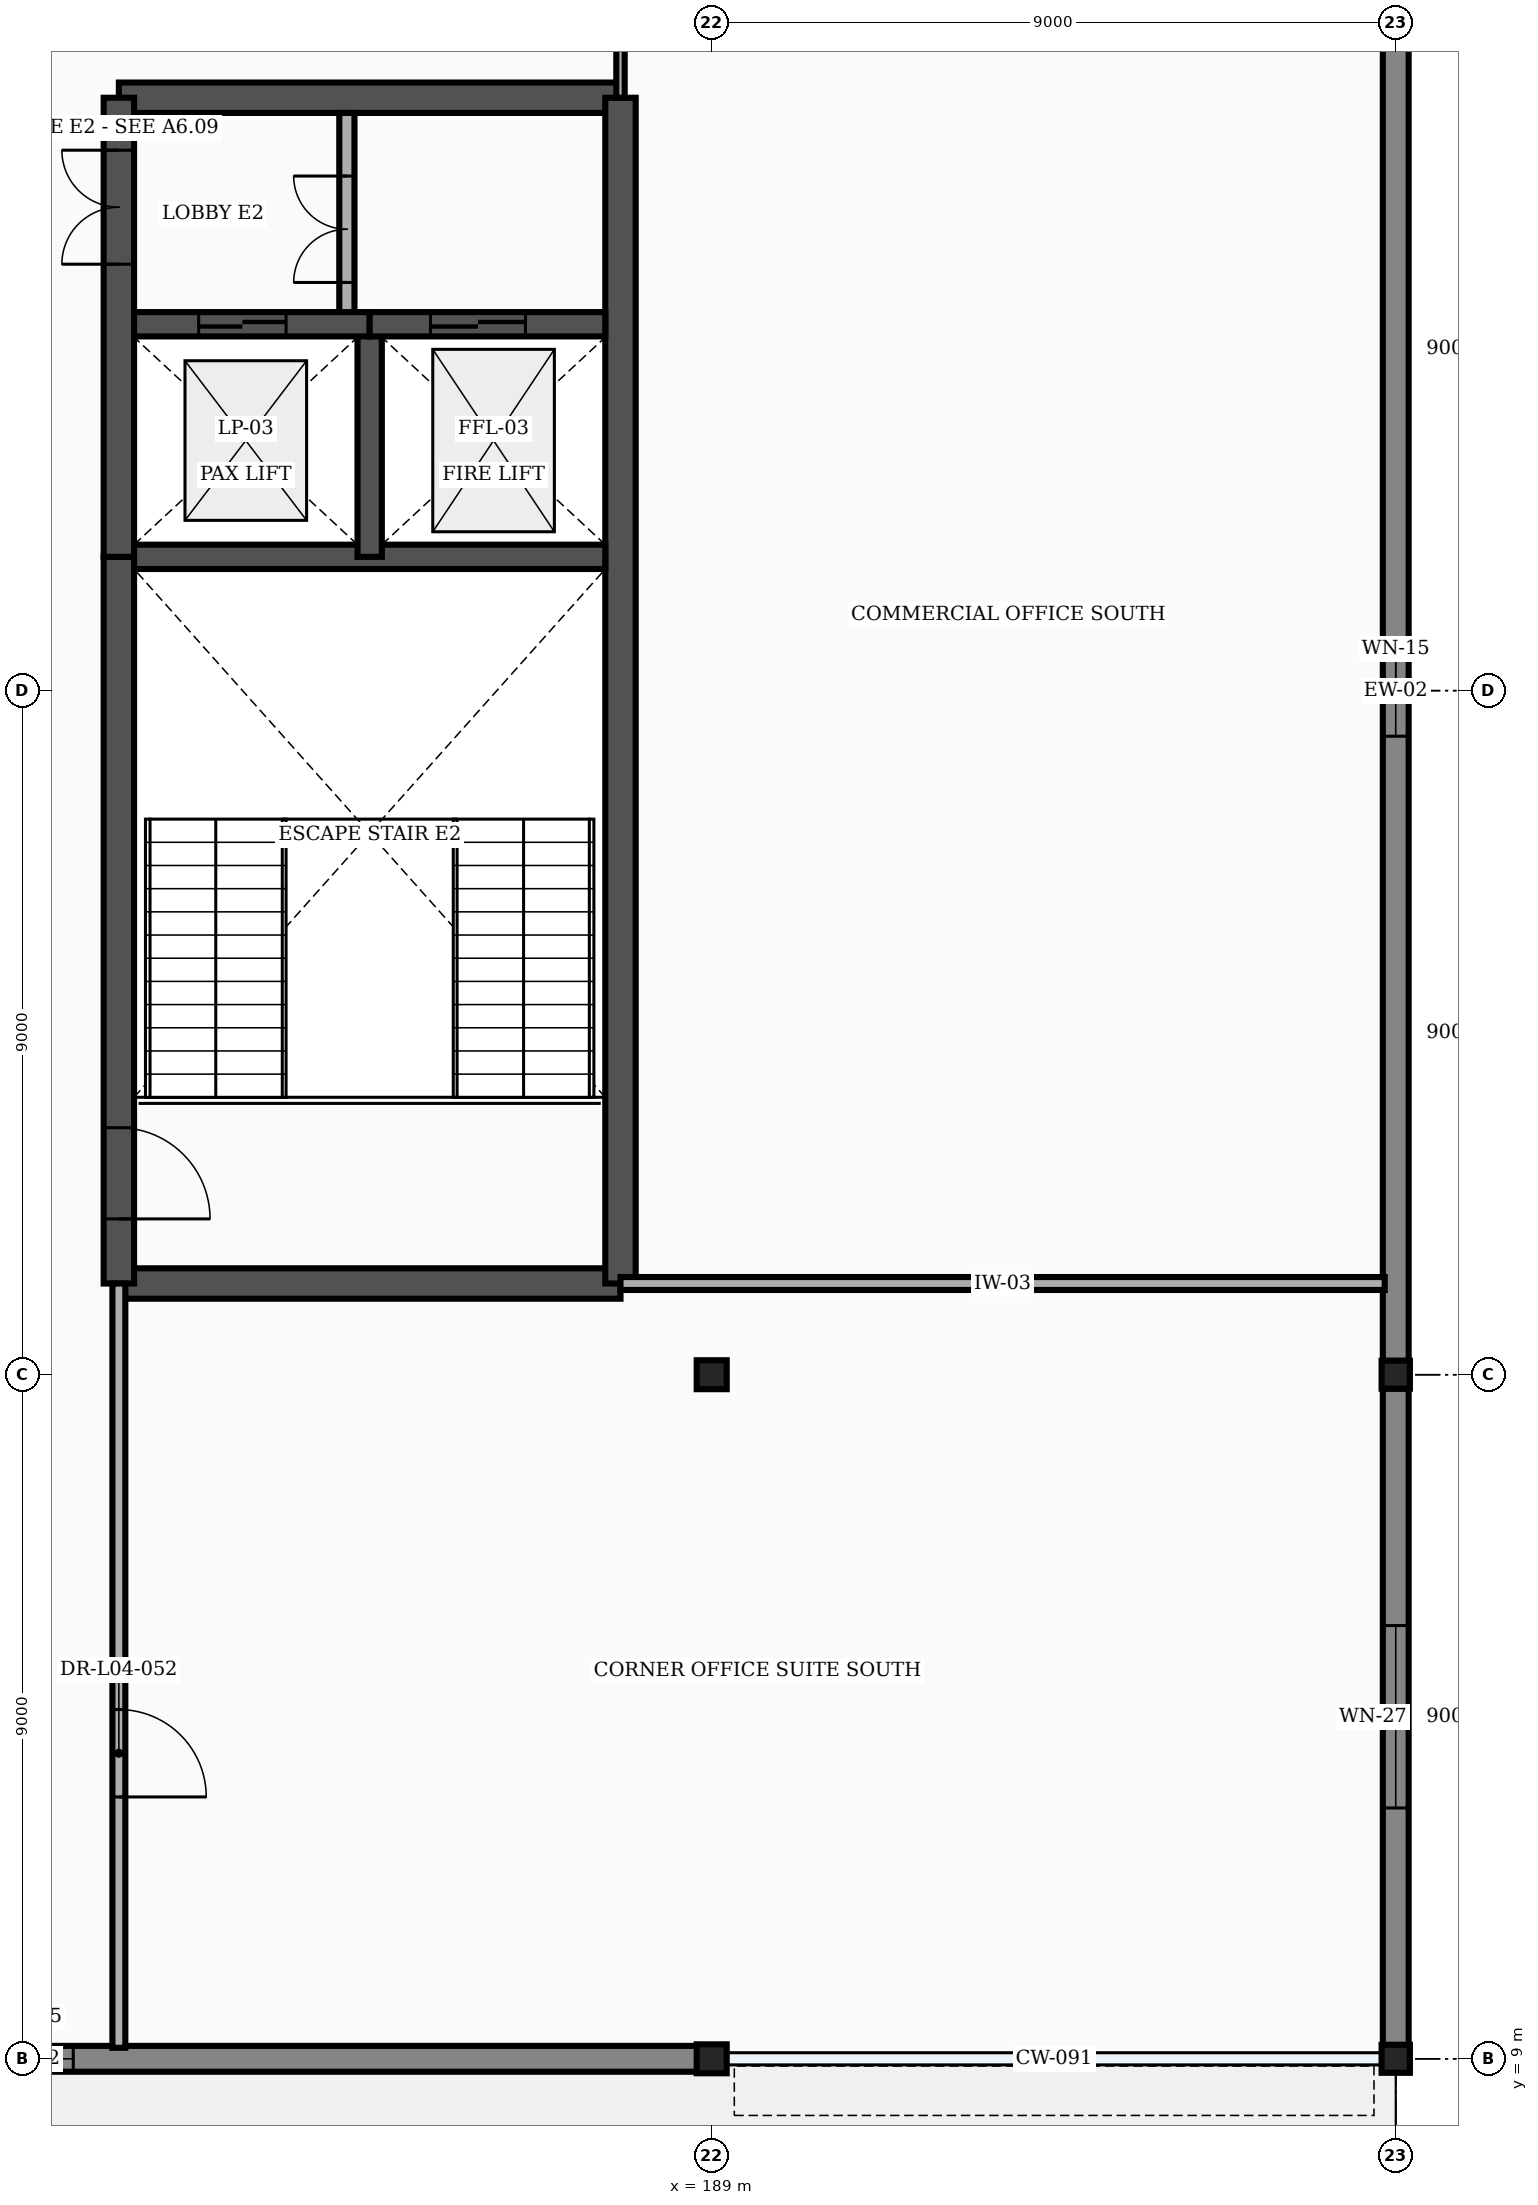
"""IFC4 building model, lengths in metres.
Left out: names, types, materials, properties, quantities, classifications, styles, units other than length and angle.
Written with IfcOpenShell. Run it as: python <this file> out.ifc"""

import sys

from ifc_helpers import new_model, si_unit, direction, frame, frame_2d, origin, origin_2d, place, context, subcontext, project, spatial, rectangle, i_section, extrude, element, fill, save


model = new_model("IFC4")
c1 = context("Model", 3, precision=1e-05, world=origin(), true_north=direction((0.0, 1.0)))
c2 = subcontext(c1, "Body", "Model", "MODEL_VIEW")
j1 = project(units=[si_unit("LENGTHUNIT", "METRE"), si_unit("PLANEANGLEUNIT", "RADIAN")], contexts=[c1])
p1 = place(None, origin())
s1 = spatial("IfcSite", under=j1, at=p1, CompositionType="ELEMENT")
p2 = place(p1, origin())
s2 = spatial("IfcBuilding", under=s1, at=p2, CompositionType="ELEMENT")
p3 = place(p2, frame((0.0, 0.0, 21.6)))
s3 = spatial("IfcBuildingStorey", under=s2, at=p3, CompositionType="ELEMENT", Elevation=21.6)
for number, where, z_axis, x_axis in (
    (1, (189.0, 9.0, 0.0), (0.0, 0.0, 1.0), (1.0, 0.0, 0.0)),
    (2, (189.0, 18.0, 0.0), (0.0, 0.0, 1.0), (1.0, 0.0, 0.0)),
):
    element("IfcColumn", number, at=place(p3, frame(where, z_axis=z_axis, x_axis=x_axis)), inside=s3, PredefinedType="COLUMN", context=c2, shape_type="SweptSolid", body=[
        extrude(i_section(OverallWidth=0.395, OverallDepth=0.381, WebThickness=0.018, FlangeThickness=0.03, at=origin_2d()), origin(), (0.0, 0.0, 1.0), 3.9),
    ])
for number, where, z_axis, x_axis in (
    (3, (198.0, 9.0, 0.0), (0.0, 0.0, 1.0), (1.0, 0.0, 0.0)),
    (4, (198.0, 18.0, 0.0), (0.0, 0.0, 1.0), (1.0, 0.0, 0.0)),
):
    element("IfcColumn", number, at=place(p3, frame(where, z_axis=z_axis, x_axis=x_axis)), inside=s3, PredefinedType="COLUMN", context=c2, shape_type="SweptSolid", body=[
        extrude(i_section(OverallWidth=0.373, OverallDepth=0.368, WebThickness=0.014, FlangeThickness=0.024, FilletRadius=0.015, at=origin_2d()), origin(), (0.0, 0.0, 1.0), 3.9),
    ])
p4 = place(p3, frame((171.01, 9.0, 0.0), z_axis=(0.0, 0.0, 1.0), x_axis=(1.0, 0.0, 0.0)))
e5 = element("IfcWall", 5, at=p4, inside=s3, PredefinedType="STANDARD", context=c2, shape_type="SweptSolid", body=[
    extrude(rectangle(XDim=17.98, YDim=0.34, at=frame_2d((8.99, 0.0))), origin(), (0.0, 0.0, 1.0), 3.245),
])
p5 = place(p4, frame((8.39, 0.0, 0.7)))
e6 = element("IfcOpeningElement", 6, at=p5, cuts=e5, PredefinedType="OPENING", context=c2, shape_type="SweptSolid", body=[
    extrude(rectangle(XDim=1.2, YDim=1.95, at=frame_2d((0.6, 0.975))), frame((0.0, 0.182, 0.0), z_axis=(0.0, -1.0, 0.0), x_axis=(1.0, 0.0, 0.0)), (0.0, 0.0, 1.0), 0.364),
])
p6 = place(p3, frame((198.0, 9.182, 0.0), z_axis=(0.0, 0.0, 1.0), x_axis=(0.0, 1.0, 0.0)))
e7 = element("IfcWall", 7, at=p6, inside=s3, PredefinedType="STANDARD", context=c2, shape_type="SweptSolid", body=[
    extrude(rectangle(XDim=8.636, YDim=0.34, at=frame_2d((4.318, 0.0))), origin(), (0.0, 0.0, 1.0), 3.585),
])
p7 = place(p6, frame((3.118, 0.0, 0.7)))
e8 = element("IfcOpeningElement", 8, at=p7, cuts=e7, PredefinedType="OPENING", context=c2, shape_type="SweptSolid", body=[
    extrude(rectangle(XDim=2.4, YDim=1.95, at=frame_2d((1.2, 0.975))), frame((0.0, 0.182, 0.0), z_axis=(0.0, -1.0, 0.0), x_axis=(1.0, 0.0, 0.0)), (0.0, 0.0, 1.0), 0.364),
])
p8 = place(p3, frame((198.0, 18.182, 0.0), z_axis=(0.0, 0.0, 1.0), x_axis=(0.0, 1.0, 0.0)))
e9 = element("IfcWall", 9, at=p8, inside=s3, PredefinedType="STANDARD", context=c2, shape_type="SweptSolid", body=[
    extrude(rectangle(XDim=17.636, YDim=0.34, at=frame_2d((8.818, 0.0))), origin(), (0.0, 0.0, 1.0), 2.973),
])
p9 = place(p8, frame((8.218, 0.0, 0.7)))
e10 = element("IfcOpeningElement", 10, at=p9, cuts=e9, PredefinedType="OPENING", context=c2, shape_type="SweptSolid", body=[
    extrude(rectangle(XDim=1.2, YDim=1.95, at=frame_2d((0.6, 0.975))), frame((0.0, 0.182, 0.0), z_axis=(0.0, -1.0, 0.0), x_axis=(1.0, 0.0, 0.0)), (0.0, 0.0, 1.0), 0.364),
])
for number, where, z_axis, x_axis in (
    (11, (181.2, 19.2, 0.0), (0.0, 0.0, 1.0), (1.0, 0.0, 0.0)),
    (12, (181.2, 34.8, 0.0), (0.0, 0.0, 1.0), (1.0, 0.0, 0.0)),
):
    element("IfcWall", number, at=place(p3, frame(where, z_axis=z_axis, x_axis=x_axis)), inside=s3, PredefinedType="SHEAR", context=c2, shape_type="SweptSolid", body=[
        extrude(rectangle(XDim=6.6, YDim=0.4, at=frame_2d((3.3, 0.0))), origin(), (0.0, 0.0, 1.0), 3.585),
    ])
p10 = place(p3, frame((187.8, 19.2, 0.0), z_axis=(0.0, 0.0, 1.0), x_axis=(0.0, 1.0, 0.0)))
e13 = element("IfcWall", 13, at=p10, inside=s3, PredefinedType="SHEAR", context=c2, shape_type="SweptSolid", body=[
    extrude(rectangle(XDim=15.6, YDim=0.4, at=frame_2d((7.8, 0.0))), origin(), (0.0, 0.0, 1.0), 3.585),
])
p11 = place(p3, frame((181.2, 19.2, 0.0), z_axis=(0.0, 0.0, 1.0), x_axis=(0.0, 1.0, 0.0)))
e14 = element("IfcWall", 14, at=p11, inside=s3, PredefinedType="SHEAR", context=c2, shape_type="SweptSolid", body=[
    extrude(rectangle(XDim=9.56, YDim=0.4, at=frame_2d((4.78, 0.0))), origin(), (0.0, 0.0, 1.0), 3.585),
])
p12 = place(p11, frame((0.85, 0.0, 0.0)))
e15 = element("IfcOpeningElement", 15, at=p12, cuts=e14, PredefinedType="OPENING", context=c2, shape_type="SweptSolid", body=[
    extrude(rectangle(XDim=1.2, YDim=2.2, at=frame_2d((0.6, 1.1))), frame((0.0, 0.212, 0.0), z_axis=(0.0, -1.0, 0.0), x_axis=(1.0, 0.0, 0.0)), (0.0, 0.0, 1.0), 0.424),
])
p13 = place(p3, frame((181.2, 28.76, 0.0), z_axis=(0.0, 0.0, 1.0), x_axis=(0.0, 1.0, 0.0)))
e16 = element("IfcWall", 16, at=p13, inside=s3, PredefinedType="SHEAR", context=c2, shape_type="SweptSolid", body=[
    extrude(rectangle(XDim=6.04, YDim=0.4, at=frame_2d((3.02, 0.0))), origin(), (0.0, 0.0, 1.0), 3.585),
])
p14 = place(p13, frame((3.85, 0.0, 0.0)))
e17 = element("IfcOpeningElement", 17, at=p14, cuts=e16, PredefinedType="OPENING", context=c2, shape_type="SweptSolid", body=[
    extrude(rectangle(XDim=1.5, YDim=2.2, at=frame_2d((0.75, 1.1))), frame((0.0, 0.212, 0.0), z_axis=(0.0, -1.0, 0.0), x_axis=(1.0, 0.0, 0.0)), (0.0, 0.0, 1.0), 0.424),
])
p15 = place(p3, frame((181.4, 28.76, 0.0), z_axis=(0.0, 0.0, 1.0), x_axis=(1.0, 0.0, 0.0)))
e18 = element("IfcWall", 18, at=p15, inside=s3, PredefinedType="SHEAR", context=c2, shape_type="SweptSolid", body=[
    extrude(rectangle(XDim=6.2, YDim=0.32, at=frame_2d((3.1, 0.0))), origin(), (0.0, 0.0, 1.0), 3.585),
])
p16 = place(p3, frame((184.5, 28.76, 0.0), z_axis=(0.0, 0.0, 1.0), x_axis=(0.0, 1.0, 0.0)))
e19 = element("IfcWall", 19, at=p16, inside=s3, PredefinedType="SHEAR", context=c2, shape_type="SweptSolid", body=[
    extrude(rectangle(XDim=3.06, YDim=0.32, at=frame_2d((1.53, 0.0))), origin(), (0.0, 0.0, 1.0), 3.585),
])
p17 = place(p3, frame((184.2, 31.82, 0.0), z_axis=(0.0, 0.0, 1.0), x_axis=(0.0, 1.0, 0.0)))
e20 = element("IfcWall", 20, at=p17, inside=s3, PredefinedType="PARTITIONING", context=c2, shape_type="SweptSolid", body=[
    extrude(rectangle(XDim=2.78, YDim=0.2, at=frame_2d((1.39, 0.0))), origin(), (0.0, 0.0, 1.0), 3.585),
])
p18 = place(p17, frame((0.55, 0.0, 0.0)))
e21 = element("IfcOpeningElement", 21, at=p18, cuts=e20, PredefinedType="OPENING", context=c2, shape_type="SweptSolid", body=[
    extrude(rectangle(XDim=1.4, YDim=2.25, at=frame_2d((0.7, 1.125))), frame((0.0, 0.112, 0.0), z_axis=(0.0, -1.0, 0.0), x_axis=(1.0, 0.0, 0.0)), (0.0, 0.0, 1.0), 0.224),
])
p19 = place(p3, frame((181.4, 31.82, 0.0), z_axis=(0.0, 0.0, 1.0), x_axis=(1.0, 0.0, 0.0)))
e22 = element("IfcWall", 22, at=p19, inside=s3, PredefinedType="SHEAR", context=c2, shape_type="SweptSolid", body=[
    extrude(rectangle(XDim=3.1, YDim=0.32, at=frame_2d((1.55, 0.0))), origin(), (0.0, 0.0, 1.0), 3.585),
])
p20 = place(p19, frame((0.85, 0.0, 0.0)))
e23 = element("IfcOpeningElement", 23, at=p20, cuts=e22, PredefinedType="OPENING", context=c2, shape_type="SweptSolid", body=[
    extrude(rectangle(XDim=1.15, YDim=2.2, at=frame_2d((0.575, 1.1))), frame((0.0, 0.172, 0.0), z_axis=(0.0, -1.0, 0.0), x_axis=(1.0, 0.0, 0.0)), (0.0, 0.0, 1.0), 0.344),
])
p21 = place(p3, frame((184.5, 31.82, 0.0), z_axis=(0.0, 0.0, 1.0), x_axis=(1.0, 0.0, 0.0)))
e24 = element("IfcWall", 24, at=p21, inside=s3, PredefinedType="SHEAR", context=c2, shape_type="SweptSolid", body=[
    extrude(rectangle(XDim=3.1, YDim=0.32, at=frame_2d((1.55, 0.0))), origin(), (0.0, 0.0, 1.0), 3.585),
])
p22 = place(p21, frame((0.8, 0.0, 0.0)))
e25 = element("IfcOpeningElement", 25, at=p22, cuts=e24, PredefinedType="OPENING", context=c2, shape_type="SweptSolid", body=[
    extrude(rectangle(XDim=1.25, YDim=2.25, at=frame_2d((0.625, 1.125))), frame((0.0, 0.172, 0.0), z_axis=(0.0, -1.0, 0.0), x_axis=(1.0, 0.0, 0.0)), (0.0, 0.0, 1.0), 0.344),
])
p23 = place(p3, frame((187.8, 34.8, 0.0), z_axis=(0.0, 0.0, 1.0), x_axis=(0.0, 1.0, 0.0)))
e26 = element("IfcWall", 26, at=p23, inside=s3, PredefinedType="PARTITIONING", context=c2, shape_type="SweptSolid", body=[
    extrude(rectangle(XDim=2.0, YDim=0.11, at=frame_2d((1.0, 0.0))), origin(), (0.0, 0.0, 1.0), 3.585),
])
p24 = place(p3, frame((187.8, 19.2, 0.0), z_axis=(0.0, 0.0, 1.0), x_axis=(1.0, 0.0, 0.0)))
e27 = element("IfcWall", 27, at=p24, inside=s3, PredefinedType="PARTITIONING", context=c2, shape_type="SweptSolid", body=[
    extrude(rectangle(XDim=10.055, YDim=0.17, at=frame_2d((5.027, 0.0))), origin(), (0.0, 0.0, 1.0), 3.585),
])
p25 = place(p3, frame((181.2, 9.145, 0.0), z_axis=(0.0, 0.0, 1.0), x_axis=(0.0, 1.0, 0.0)))
e28 = element("IfcWall", 28, at=p25, inside=s3, PredefinedType="PARTITIONING", context=c2, shape_type="SweptSolid", body=[
    extrude(rectangle(XDim=10.055, YDim=0.17, at=frame_2d((5.027, 0.0))), origin(), (0.0, 0.0, 1.0), 3.585),
])
p26 = place(p25, frame((3.3, 0.0, 0.0)))
e29 = element("IfcOpeningElement", 29, at=p26, cuts=e28, PredefinedType="OPENING", context=c2, shape_type="SweptSolid", body=[
    extrude(rectangle(XDim=1.15, YDim=2.15, at=frame_2d((0.575, 1.075))), frame((0.0, 0.097, 0.0), z_axis=(0.0, -1.0, 0.0), x_axis=(1.0, 0.0, 0.0)), (0.0, 0.0, 1.0), 0.194),
])
p27 = place(p5, origin())
e30 = element("IfcWindow", 30, at=p27, inside=s3, PartitioningType="SINGLE_PANEL", PredefinedType="WINDOW", context=c2, shape_type="SweptSolid", body=[
    extrude(rectangle(XDim=1.2, YDim=1.95, at=frame_2d((0.6, 0.975))), frame((0.0, 0.03, 0.0), z_axis=(0.0, -1.0, 0.0), x_axis=(1.0, 0.0, 0.0)), (0.0, 0.0, 1.0), 0.06),
])
fill(e6, e30)
p28 = place(p7, origin())
e31 = element("IfcWindow", 31, at=p28, inside=s3, PartitioningType="SINGLE_PANEL", PredefinedType="WINDOW", context=c2, shape_type="SweptSolid", body=[
    extrude(rectangle(XDim=2.4, YDim=1.95, at=frame_2d((1.2, 0.975))), frame((0.0, 0.03, 0.0), z_axis=(0.0, -1.0, 0.0), x_axis=(1.0, 0.0, 0.0)), (0.0, 0.0, 1.0), 0.06),
])
fill(e8, e31)
p29 = place(p9, origin())
e32 = element("IfcWindow", 32, at=p29, inside=s3, PartitioningType="SINGLE_PANEL", PredefinedType="WINDOW", context=c2, shape_type="SweptSolid", body=[
    extrude(rectangle(XDim=1.2, YDim=1.95, at=frame_2d((0.6, 0.975))), frame((0.0, 0.03, 0.0), z_axis=(0.0, -1.0, 0.0), x_axis=(1.0, 0.0, 0.0)), (0.0, 0.0, 1.0), 0.06),
])
fill(e10, e32)
p30 = place(p12, frame((1.2, 0.0, 0.0), z_axis=(0.0, 0.0, 1.0), x_axis=(-1.0, 0.0, 0.0)))
e33 = element("IfcDoor", 33, at=p30, inside=s3, OperationType="SINGLE_SWING_RIGHT", PredefinedType="DOOR", context=c2, shape_type="SweptSolid", body=[
    extrude(rectangle(XDim=1.2, YDim=2.2, at=frame_2d((0.6, 1.1))), frame((0.0, 0.025, 0.0), z_axis=(0.0, -1.0, 0.0), x_axis=(1.0, 0.0, 0.0)), (0.0, 0.0, 1.0), 0.05),
])
fill(e15, e33)
p31 = place(p14, origin())
e34 = element("IfcDoor", 34, at=p31, inside=s3, OperationType="DOUBLE_DOOR_SINGLE_SWING", PredefinedType="DOOR", context=c2, shape_type="SweptSolid", body=[
    extrude(rectangle(XDim=1.5, YDim=2.2, at=frame_2d((0.75, 1.1))), frame((0.0, 0.025, 0.0), z_axis=(0.0, -1.0, 0.0), x_axis=(1.0, 0.0, 0.0)), (0.0, 0.0, 1.0), 0.05),
])
fill(e17, e34)
p32 = place(p18, origin())
e35 = element("IfcDoor", 35, at=p32, inside=s3, OperationType="DOUBLE_DOOR_SINGLE_SWING", PredefinedType="DOOR", context=c2, shape_type="SweptSolid", body=[
    extrude(rectangle(XDim=1.4, YDim=2.25, at=frame_2d((0.7, 1.125))), frame((0.0, 0.025, 0.0), z_axis=(0.0, -1.0, 0.0), x_axis=(1.0, 0.0, 0.0)), (0.0, 0.0, 1.0), 0.05),
])
fill(e21, e35)
p33 = place(p20, origin())
e36 = element("IfcDoor", 36, at=p33, inside=s3, OperationType="DOUBLE_DOOR_SLIDING", PredefinedType="DOOR", context=c2, shape_type="SweptSolid", body=[
    extrude(rectangle(XDim=1.15, YDim=2.2, at=frame_2d((0.575, 1.1))), frame((0.0, 0.025, 0.0), z_axis=(0.0, -1.0, 0.0), x_axis=(1.0, 0.0, 0.0)), (0.0, 0.0, 1.0), 0.05),
])
fill(e23, e36)
p34 = place(p22, origin())
e37 = element("IfcDoor", 37, at=p34, inside=s3, OperationType="DOUBLE_DOOR_SLIDING", PredefinedType="DOOR", context=c2, shape_type="SweptSolid", body=[
    extrude(rectangle(XDim=1.25, YDim=2.25, at=frame_2d((0.625, 1.125))), frame((0.0, 0.025, 0.0), z_axis=(0.0, -1.0, 0.0), x_axis=(1.0, 0.0, 0.0)), (0.0, 0.0, 1.0), 0.05),
])
fill(e25, e37)
p35 = place(p26, frame((1.15, 0.0, 0.0), z_axis=(0.0, 0.0, 1.0), x_axis=(-1.0, 0.0, 0.0)))
e38 = element("IfcDoor", 38, at=p35, inside=s3, OperationType="SINGLE_SWING_RIGHT", PredefinedType="DOOR", context=c2, shape_type="SweptSolid", body=[
    extrude(rectangle(XDim=1.15, YDim=2.15, at=frame_2d((0.575, 1.075))), frame((0.0, 0.025, 0.0), z_axis=(0.0, -1.0, 0.0), x_axis=(1.0, 0.0, 0.0)), (0.0, 0.0, 1.0), 0.05),
])
fill(e29, e38)
save(model, sys.argv[1])
